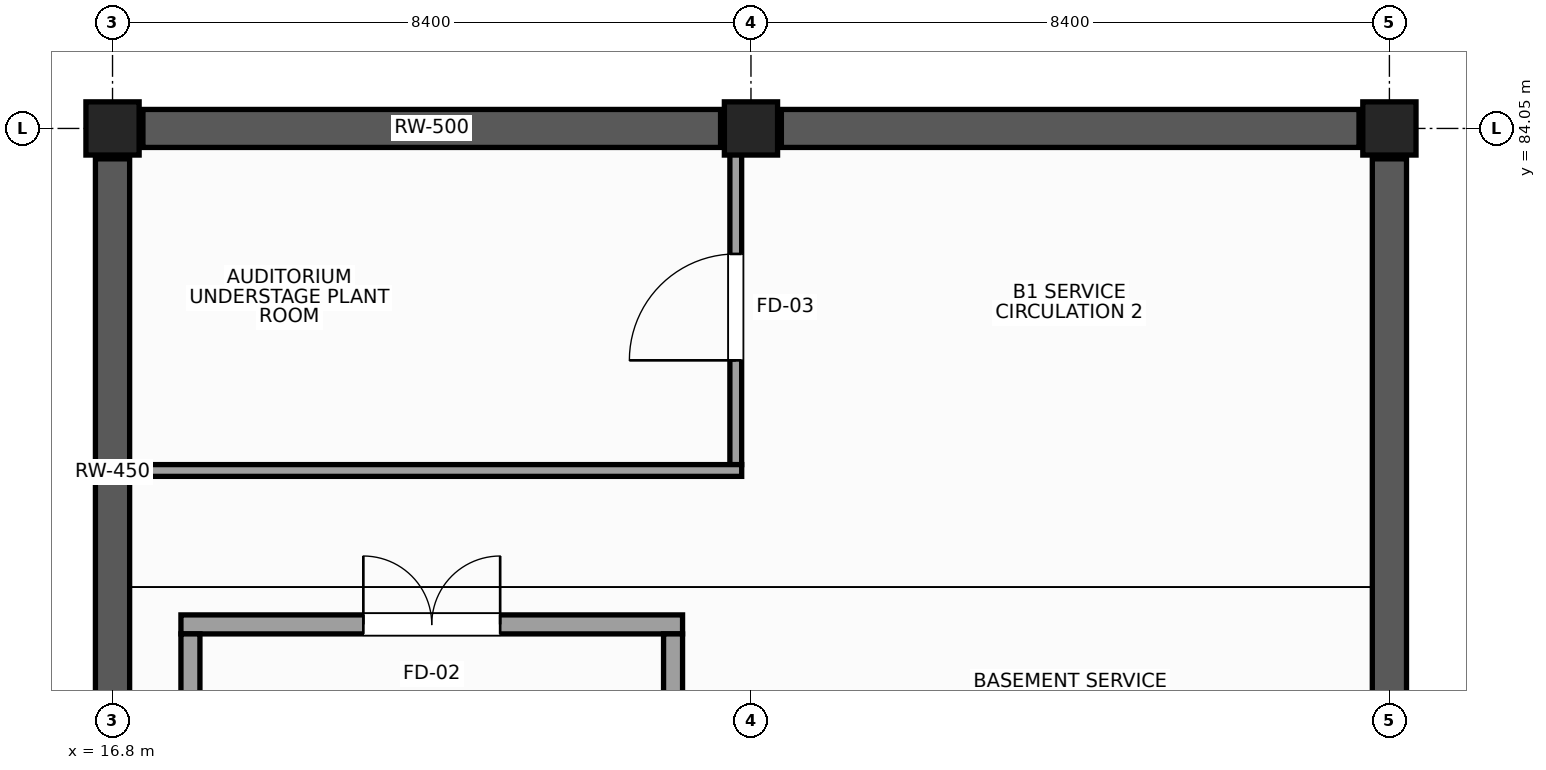
"""IFC4 building model, lengths in metres.
Left out: names, types, materials, properties, quantities, classifications, styles, units other than length and angle.
Written with IfcOpenShell. Run it as: python <this file> out.ifc"""

import sys

from ifc_helpers import new_model, si_unit, direction, frame, frame_2d, origin, origin_2d, place, context, subcontext, project, spatial, rectangle, extrude, element, fill, save


model = new_model("IFC4")
c1 = context("Model", 3, precision=1e-05, world=origin(), true_north=direction((0.0, 1.0)))
c2 = subcontext(c1, "Body", "Model", "MODEL_VIEW")
j1 = project(units=[si_unit("LENGTHUNIT", "METRE"), si_unit("PLANEANGLEUNIT", "RADIAN")], contexts=[c1])
p1 = place(None, origin())
s1 = spatial("IfcSite", under=j1, at=p1, CompositionType="ELEMENT")
p2 = place(p1, origin())
s2 = spatial("IfcBuilding", under=s1, at=p2, CompositionType="ELEMENT")
p3 = place(p2, frame((0.0, 0.0, -5.4)))
s3 = spatial("IfcBuildingStorey", under=s2, at=p3, CompositionType="ELEMENT", Elevation=-5.4)
for number, where, z_axis, x_axis in (
    (1, (16.8, 84.05, -0.4), (0.0, 0.0, 1.0), (1.0, 0.0, 0.0)),
    (2, (25.2, 84.05, -0.4), (0.0, 0.0, 1.0), (1.0, 0.0, 0.0)),
    (3, (33.6, 84.05, -0.4), (0.0, 0.0, 1.0), (1.0, 0.0, 0.0)),
):
    element("IfcColumn", number, at=place(p3, frame(where, z_axis=z_axis, x_axis=x_axis)), inside=s3, PredefinedType="COLUMN", context=c2, shape_type="SweptSolid", body=[
        extrude(rectangle(XDim=0.7, YDim=0.7, at=origin_2d()), origin(), (0.0, 0.0, 1.0), 5.8),
    ])
p4 = place(p3, frame((16.8, 75.4, 0.0), z_axis=(0.0, 0.0, 1.0), x_axis=(0.0, 1.0, 0.0)))
e4 = element("IfcWall", 4, at=p4, inside=s3, PredefinedType="USERDEFINED", context=c2, shape_type="SweptSolid", body=[
    extrude(rectangle(XDim=8.25, YDim=0.45, at=frame_2d((4.125, 0.0))), origin(), (0.0, 0.0, 1.0), 5.08),
])
p5 = place(p3, frame((17.2, 84.05, 0.0), z_axis=(0.0, 0.0, 1.0), x_axis=(1.0, 0.0, 0.0)))
e5 = element("IfcWall", 5, at=p5, inside=s3, PredefinedType="USERDEFINED", context=c2, shape_type="SweptSolid", body=[
    extrude(rectangle(XDim=7.6, YDim=0.5, at=frame_2d((3.8, 0.0))), origin(), (0.0, 0.0, 1.0), 5.08),
])
p6 = place(p3, frame((25.6, 84.05, 0.0), z_axis=(0.0, 0.0, 1.0), x_axis=(1.0, 0.0, 0.0)))
e6 = element("IfcWall", 6, at=p6, inside=s3, PredefinedType="USERDEFINED", context=c2, shape_type="SweptSolid", body=[
    extrude(rectangle(XDim=7.6, YDim=0.5, at=frame_2d((3.8, 0.0))), origin(), (0.0, 0.0, 1.0), 5.08),
])
p7 = place(p3, frame((33.6, 83.65, 0.0), z_axis=(0.0, 0.0, 1.0), x_axis=(0.0, -1.0, 0.0)))
e7 = element("IfcWall", 7, at=p7, inside=s3, PredefinedType="USERDEFINED", context=c2, shape_type="SweptSolid", body=[
    extrude(rectangle(XDim=8.25, YDim=0.45, at=frame_2d((4.125, 0.0))), origin(), (0.0, 0.0, 1.0), 5.08),
])
p8 = place(p3, frame((17.7, 77.525, 0.0), z_axis=(0.0, 0.0, 1.0), x_axis=(1.0, 0.0, 0.0)))
e8 = element("IfcWall", 8, at=p8, inside=s3, PredefinedType="PARTITIONING", context=c2, shape_type="SweptSolid", body=[
    extrude(rectangle(XDim=6.6, YDim=0.25, at=frame_2d((3.3, 0.0))), origin(), (0.0, 0.0, 1.0), 5.08),
])
p9 = place(p8, frame((2.4, 0.0, 0.0)))
e9 = element("IfcOpeningElement", 9, at=p9, cuts=e8, PredefinedType="OPENING", context=c2, shape_type="SweptSolid", body=[
    extrude(rectangle(XDim=1.8, YDim=2.25, at=frame_2d((0.9, 1.125))), frame((0.0, 0.135, 0.0), z_axis=(0.0, -1.0, 0.0), x_axis=(1.0, 0.0, 0.0)), (0.0, 0.0, 1.0), 0.27),
])
for number, where, z_axis, x_axis in (
    (10, (17.825, 74.45, 0.0), (0.0, 0.0, 1.0), (0.0, 1.0, 0.0)),
    (11, (24.175, 74.45, 0.0), (0.0, 0.0, 1.0), (0.0, 1.0, 0.0)),
):
    element("IfcWall", number, at=place(p3, frame(where, z_axis=z_axis, x_axis=x_axis)), inside=s3, PredefinedType="PARTITIONING", context=c2, shape_type="SweptSolid", body=[
        extrude(rectangle(XDim=2.95, YDim=0.25, at=frame_2d((1.475, 0.0))), origin(), (0.0, 0.0, 1.0), 4.23),
    ])
p10 = place(p3, frame((25.0, 79.627, 0.0), z_axis=(0.0, 0.0, 1.0), x_axis=(0.0, 1.0, 0.0)))
e12 = element("IfcWall", 12, at=p10, inside=s3, PredefinedType="PARTITIONING", context=c2, shape_type="SweptSolid", body=[
    extrude(rectangle(XDim=4.145, YDim=0.155, at=frame_2d((2.073, 0.0))), origin(), (0.0, 0.0, 1.0), 4.13),
])
p11 = place(p10, frame((1.372, 0.0, 0.0)))
e13 = element("IfcOpeningElement", 13, at=p11, cuts=e12, PredefinedType="OPENING", context=c2, shape_type="SweptSolid", body=[
    extrude(rectangle(XDim=1.4, YDim=2.25, at=frame_2d((0.7, 1.125))), frame((0.0, 0.087, 0.0), z_axis=(0.0, -1.0, 0.0), x_axis=(1.0, 0.0, 0.0)), (0.0, 0.0, 1.0), 0.175),
])
p12 = place(p3, frame((16.922, 79.55, 0.0), z_axis=(0.0, 0.0, 1.0), x_axis=(1.0, 0.0, 0.0)))
e14 = element("IfcWall", 14, at=p12, inside=s3, PredefinedType="PARTITIONING", context=c2, shape_type="SweptSolid", body=[
    extrude(rectangle(XDim=8.156, YDim=0.155, at=frame_2d((4.078, 0.0))), origin(), (0.0, 0.0, 1.0), 4.13),
])
p13 = place(p9, origin())
e15 = element("IfcDoor", 15, at=p13, inside=s3, OperationType="DOUBLE_DOOR_SINGLE_SWING", PredefinedType="DOOR", context=c2, shape_type="SweptSolid", body=[
    extrude(rectangle(XDim=1.8, YDim=2.25, at=frame_2d((0.9, 1.125))), frame((0.0, 0.025, 0.0), z_axis=(0.0, -1.0, 0.0), x_axis=(1.0, 0.0, 0.0)), (0.0, 0.0, 1.0), 0.05),
])
fill(e9, e15)
p14 = place(p11, origin())
e16 = element("IfcDoor", 16, at=p14, inside=s3, OperationType="SINGLE_SWING_LEFT", PredefinedType="DOOR", context=c2, shape_type="SweptSolid", body=[
    extrude(rectangle(XDim=1.4, YDim=2.25, at=frame_2d((0.7, 1.125))), frame((0.0, 0.025, 0.0), z_axis=(0.0, -1.0, 0.0), x_axis=(1.0, 0.0, 0.0)), (0.0, 0.0, 1.0), 0.05),
])
fill(e13, e16)
save(model, sys.argv[1])
